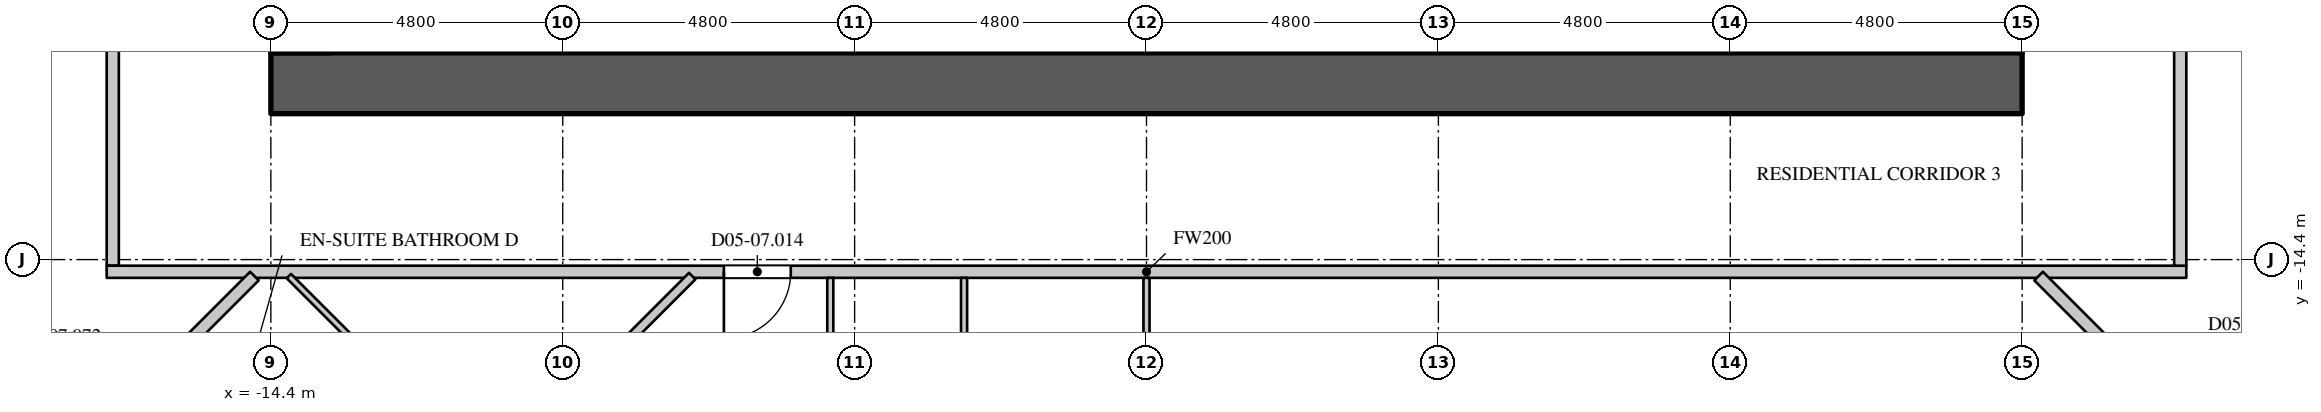
"""IFC4 building model, lengths in metres.
Left out: names, types, materials, properties, quantities, classifications, styles, units other than length and angle.
Written with IfcOpenShell. Run it as: python <this file> out.ifc"""

import sys

from ifc_helpers import new_model, si_unit, direction, frame, frame_2d, origin, place, context, subcontext, project, spatial, rectangle, extrude, element, fill, save


model = new_model("IFC4")
c1 = context("Model", 3, precision=1e-05, world=origin(), true_north=direction((0.0, 1.0)))
c2 = subcontext(c1, "Body", "Model", "MODEL_VIEW")
j1 = project(units=[si_unit("LENGTHUNIT", "METRE"), si_unit("PLANEANGLEUNIT", "RADIAN")], contexts=[c1])
p1 = place(None, origin())
s1 = spatial("IfcSite", under=j1, at=p1, CompositionType="ELEMENT")
p2 = place(p1, origin())
s2 = spatial("IfcBuilding", under=s1, at=p2, CompositionType="ELEMENT")
p3 = place(p2, frame((0.0, 0.0, 25.5)))
s3 = spatial("IfcBuildingStorey", under=s2, at=p3, CompositionType="ELEMENT", Elevation=25.5)
p4 = place(p3, frame((-14.4, -11.5, 0.0), z_axis=(0.0, 0.0, 1.0), x_axis=(1.0, 0.0, 0.0)))
e1 = element("IfcWall", 1, at=p4, inside=s3, PredefinedType="SHEAR", context=c2, shape_type="SweptSolid", body=[
    extrude(rectangle(XDim=28.8, YDim=1.0, at=frame_2d((14.4, 0.0))), origin(), (0.0, 0.0, 1.0), 4.2),
])
p5 = place(p3, frame((-17.0, -14.5, 0.0), z_axis=(0.0, 0.0, 1.0), x_axis=(0.0, 1.0, 0.0)))
e2 = element("IfcWall", 2, at=p5, inside=s3, PredefinedType="PARTITIONING", context=c2, shape_type="SweptSolid", body=[
    extrude(rectangle(XDim=29.0, YDim=0.2, at=frame_2d((14.5, 0.0))), origin(), (0.0, 0.0, 1.0), 3.95),
])
p6 = place(p5, frame((21.35, 0.0, 0.0)))
e3 = element("IfcOpeningElement", 3, at=p6, cuts=e2, PredefinedType="OPENING", context=c2, shape_type="SweptSolid", body=[
    extrude(rectangle(XDim=1.1, YDim=2.4, at=frame_2d((0.55, 1.2))), frame((0.0, 0.11, 0.0), z_axis=(0.0, -1.0, 0.0), x_axis=(1.0, 0.0, 0.0)), (0.0, 0.0, 1.0), 0.22),
])
p7 = place(p3, frame((-17.1, -14.6, 0.0), z_axis=(0.0, 0.0, 1.0), x_axis=(1.0, 0.0, 0.0)))
e4 = element("IfcWall", 4, at=p7, inside=s3, PredefinedType="PARTITIONING", context=c2, shape_type="SweptSolid", body=[
    extrude(rectangle(XDim=34.2, YDim=0.2, at=frame_2d((17.1, 0.0))), origin(), (0.0, 0.0, 1.0), 3.95),
])
p8 = place(p7, frame((10.15, 0.0, 0.0)))
e5 = element("IfcOpeningElement", 5, at=p8, cuts=e4, PredefinedType="OPENING", context=c2, shape_type="SweptSolid", body=[
    extrude(rectangle(XDim=1.1, YDim=2.4, at=frame_2d((0.55, 1.2))), frame((0.0, 0.11, 0.0), z_axis=(0.0, -1.0, 0.0), x_axis=(1.0, 0.0, 0.0)), (0.0, 0.0, 1.0), 0.22),
])
p9 = place(p3, frame((17.0, -14.5, 0.0), z_axis=(0.0, 0.0, 1.0), x_axis=(0.0, 1.0, 0.0)))
e6 = element("IfcWall", 6, at=p9, inside=s3, PredefinedType="PARTITIONING", context=c2, shape_type="SweptSolid", body=[
    extrude(rectangle(XDim=29.0, YDim=0.2, at=frame_2d((14.5, 0.0))), origin(), (0.0, 0.0, 1.0), 3.95),
])
p10 = place(p9, frame((6.55, 0.0, 0.0)))
e7 = element("IfcOpeningElement", 7, at=p10, cuts=e6, PredefinedType="OPENING", context=c2, shape_type="SweptSolid", body=[
    extrude(rectangle(XDim=1.1, YDim=2.4, at=frame_2d((0.55, 1.2))), frame((0.0, 0.11, 0.0), z_axis=(0.0, -1.0, 0.0), x_axis=(1.0, 0.0, 0.0)), (0.0, 0.0, 1.0), 0.22),
])
p11 = place(p3, frame((-22.947, -12.051, 0.0), z_axis=(0.0, 0.0, 1.0), x_axis=(0.707106781187, -0.707106781187, 0.0)))
e8 = element("IfcWall", 8, at=p11, inside=s3, PredefinedType="PARTITIONING", context=c2, shape_type="SweptSolid", body=[
    extrude(rectangle(XDim=7.705, YDim=0.15, at=frame_2d((3.853, 0.0))), origin(), (0.0, 0.0, 1.0), 3.95),
])
p12 = place(p11, frame((4.65, 0.0, 0.0)))
e9 = element("IfcOpeningElement", 9, at=p12, cuts=e8, PredefinedType="OPENING", context=c2, shape_type="SweptSolid", body=[
    extrude(rectangle(XDim=0.95, YDim=2.2, at=frame_2d((0.475, 1.1))), frame((0.0, 0.085, 0.0), z_axis=(0.0, -1.0, 0.0), x_axis=(1.0, 0.0, 0.0)), (0.0, 0.0, 1.0), 0.17),
])
p13 = place(p3, frame((-9.547, -16.747, 0.0), z_axis=(0.0, 0.0, 1.0), x_axis=(0.707065207457, 0.707148352472, 0.0)))
e10 = element("IfcWall", 10, at=p13, inside=s3, PredefinedType="PARTITIONING", context=c2, shape_type="SweptSolid", body=[
    extrude(rectangle(XDim=2.936, YDim=0.15, at=frame_2d((1.468, 0.0))), origin(), (0.0, 0.0, 1.0), 3.95),
])
p14 = place(p3, frame((17.499, -17.499, 0.0), z_axis=(0.0, 0.0, 1.0), x_axis=(0.707106781187, 0.707106781187, 0.0)))
e11 = element("IfcWall", 11, at=p14, inside=s3, PredefinedType="PARTITIONING", context=c2, shape_type="SweptSolid", body=[
    extrude(rectangle(XDim=7.855, YDim=0.15, at=frame_2d((3.927, 0.0))), origin(), (0.0, 0.0, 1.0), 3.95),
])
p15 = place(p14, frame((2.0, 0.0, 0.0)))
e12 = element("IfcOpeningElement", 12, at=p15, cuts=e11, PredefinedType="OPENING", context=c2, shape_type="SweptSolid", body=[
    extrude(rectangle(XDim=0.95, YDim=2.2, at=frame_2d((0.475, 1.1))), frame((0.0, 0.085, 0.0), z_axis=(0.0, -1.0, 0.0), x_axis=(1.0, 0.0, 0.0)), (0.0, 0.0, 1.0), 0.17),
])
for number, where, z_axis, x_axis in (
    (13, (-19.606, -19.606, 0.0), (0.0, 0.0, 1.0), (0.707, 0.707, 0.0)),
    (14, (14.671, -14.671, 0.0), (0.0, 0.0, 1.0), (0.707, -0.707, 0.0)),
):
    element("IfcWall", number, at=place(p3, frame(where, z_axis=z_axis, x_axis=x_axis)), inside=s3, PredefinedType="PARTITIONING", context=c2, shape_type="SweptSolid", body=[
        extrude(rectangle(XDim=6.979, YDim=0.2, at=frame_2d((3.49, 0.0))), origin(), (0.0, 0.0, 1.0), 3.95),
    ])
p16 = place(p3, frame((-14.104, -14.671, 0.0), z_axis=(0.0, 0.0, 1.0), x_axis=(0.707106781187, -0.707106781187, 0.0)))
e15 = element("IfcWall", 15, at=p16, inside=s3, PredefinedType="PARTITIONING", context=c2, shape_type="SweptSolid", body=[
    extrude(rectangle(XDim=2.35, YDim=0.1, at=frame_2d((1.175, 0.0))), origin(), (0.0, 0.0, 1.0), 3.95),
])
p17 = place(p3, frame((-5.2, -21.725, 0.0), z_axis=(0.0, 0.0, 1.0), x_axis=(0.0, 1.0, 0.0)))
e16 = element("IfcWall", 16, at=p17, inside=s3, PredefinedType="PARTITIONING", context=c2, shape_type="SweptSolid", body=[
    extrude(rectangle(XDim=7.025, YDim=0.1, at=frame_2d((3.513, 0.0))), origin(), (0.0, 0.0, 1.0), 3.95),
])
p18 = place(p17, frame((3.05, 0.0, 0.0)))
e17 = element("IfcOpeningElement", 17, at=p18, cuts=e16, PredefinedType="OPENING", context=c2, shape_type="SweptSolid", body=[
    extrude(rectangle(XDim=0.9, YDim=2.2, at=frame_2d((0.45, 1.1))), frame((0.0, 0.06, 0.0), z_axis=(0.0, -1.0, 0.0), x_axis=(1.0, 0.0, 0.0)), (0.0, 0.0, 1.0), 0.12),
])
p19 = place(p3, frame((-3.0, -21.75, 0.0), z_axis=(0.0, 0.0, 1.0), x_axis=(0.0, 1.0, 0.0)))
e18 = element("IfcWall", 18, at=p19, inside=s3, PredefinedType="PARTITIONING", context=c2, shape_type="SweptSolid", body=[
    extrude(rectangle(XDim=7.05, YDim=0.1, at=frame_2d((3.525, 0.0))), origin(), (0.0, 0.0, 1.0), 3.95),
])
p20 = place(p3, frame((0.0, -21.82, 0.0), z_axis=(0.0, 0.0, 1.0), x_axis=(0.0, 1.0, 0.0)))
e19 = element("IfcWall", 19, at=p20, inside=s3, PredefinedType="PARTITIONING", context=c2, shape_type="SweptSolid", body=[
    extrude(rectangle(XDim=7.12, YDim=0.1, at=frame_2d((3.56, 0.0))), origin(), (0.0, 0.0, 1.0), 3.95),
])
p21 = place(p20, frame((4.35, 0.0, 0.0)))
e20 = element("IfcOpeningElement", 20, at=p21, cuts=e19, PredefinedType="OPENING", context=c2, shape_type="SweptSolid", body=[
    extrude(rectangle(XDim=0.9, YDim=2.2, at=frame_2d((0.45, 1.1))), frame((0.0, 0.06, 0.0), z_axis=(0.0, -1.0, 0.0), x_axis=(1.0, 0.0, 0.0)), (0.0, 0.0, 1.0), 0.12),
])
p22 = place(p8, origin())
e21 = element("IfcDoor", 21, at=p22, inside=s3, OperationType="SINGLE_SWING_RIGHT", PredefinedType="DOOR", context=c2, shape_type="SweptSolid", body=[
    extrude(rectangle(XDim=1.1, YDim=2.4, at=frame_2d((0.55, 1.2))), frame((0.0, 0.025, 0.0), z_axis=(0.0, -1.0, 0.0), x_axis=(1.0, 0.0, 0.0)), (0.0, 0.0, 1.0), 0.05),
])
fill(e5, e21)
save(model, sys.argv[1])
